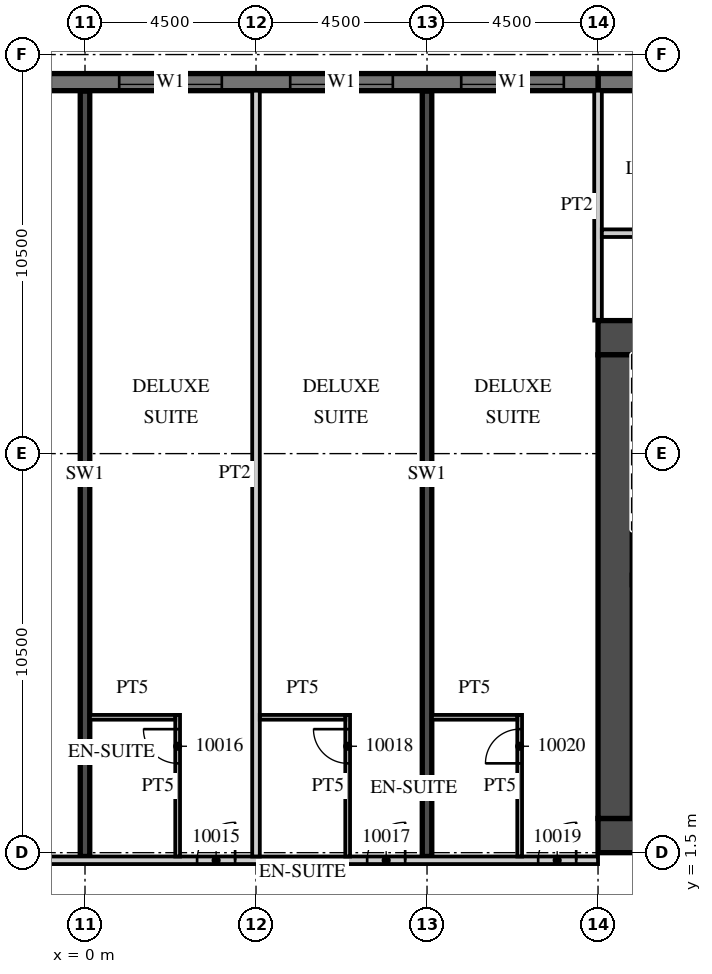
"""IFC4 building model, lengths in metres.
Left out: names, types, materials, properties, quantities, classifications, styles, units other than length and angle.
Written with IfcOpenShell. Run it as: python <this file> out.ifc"""

import sys

from ifc_helpers import new_model, si_unit, direction, frame, frame_2d, origin, place, context, subcontext, project, spatial, rectangle, extrude, element, fill, save


model = new_model("IFC4")
c1 = context("Model", 3, precision=1e-05, world=origin(), true_north=direction((0.0, 1.0)))
c2 = subcontext(c1, "Body", "Model", "MODEL_VIEW")
j1 = project(units=[si_unit("LENGTHUNIT", "METRE"), si_unit("PLANEANGLEUNIT", "RADIAN")], contexts=[c1])
p1 = place(None, origin())
s1 = spatial("IfcSite", under=j1, at=p1, CompositionType="ELEMENT")
p2 = place(p1, origin())
s2 = spatial("IfcBuilding", under=s1, at=p2, CompositionType="ELEMENT")
p3 = place(p2, frame((0.0, 0.0, 63.3)))
s3 = spatial("IfcBuildingStorey", under=s2, at=p3, CompositionType="ELEMENT", Elevation=63.3)
for number, where, z_axis, x_axis in (
    (1, (0.0, 1.4, 0.0), (0.0, 0.0, 1.0), (0.0, 1.0, 0.0)),
    (2, (9.0, 1.4, 0.0), (0.0, 0.0, 1.0), (0.0, 1.0, 0.0)),
):
    element("IfcWall", number, at=place(p3, frame(where, z_axis=z_axis, x_axis=x_axis)), inside=s3, PredefinedType="SHEAR", context=c2, shape_type="SweptSolid", body=[
        extrude(rectangle(XDim=20.14, YDim=0.25, at=frame_2d((10.07, 0.0))), origin(), (0.0, 0.0, 1.0), 3.3),
    ])
p4 = place(p3, frame((31.5, 21.775, 0.0), z_axis=(0.0, 0.0, 1.0), x_axis=(-1.0, 0.0, 0.0)))
e3 = element("IfcWall", 3, at=p4, inside=s3, PredefinedType="SOLIDWALL", context=c2, shape_type="SweptSolid", body=[
    extrude(rectangle(XDim=18.0, YDim=0.45, at=frame_2d((9.0, 0.0))), origin(), (0.0, 0.0, 1.0), 3.02),
])
p5 = place(p3, frame((13.5, 21.775, 0.0), z_axis=(0.0, 0.0, 1.0), x_axis=(-1.0, 0.0, 0.0)))
e4 = element("IfcWall", 4, at=p5, inside=s3, PredefinedType="SOLIDWALL", context=c2, shape_type="SweptSolid", body=[
    extrude(rectangle(XDim=54.5, YDim=0.45, at=frame_2d((27.25, 0.0))), origin(), (0.0, 0.0, 1.0), 3.02),
])
p6 = place(p5, frame((0.9, 0.0, 0.45)))
e5 = element("IfcOpeningElement", 5, at=p6, cuts=e4, PredefinedType="OPENING", context=c2, shape_type="SweptSolid", body=[
    extrude(rectangle(XDim=2.7, YDim=2.25, at=frame_2d((1.35, 1.125))), frame((0.0, 0.235, 0.0), z_axis=(0.0, -1.0, 0.0), x_axis=(1.0, 0.0, 0.0)), (0.0, 0.0, 1.0), 0.47),
])
p7 = place(p5, frame((5.4, 0.0, 0.45)))
e6 = element("IfcOpeningElement", 6, at=p7, cuts=e4, PredefinedType="OPENING", context=c2, shape_type="SweptSolid", body=[
    extrude(rectangle(XDim=2.7, YDim=2.25, at=frame_2d((1.35, 1.125))), frame((0.0, 0.235, 0.0), z_axis=(0.0, -1.0, 0.0), x_axis=(1.0, 0.0, 0.0)), (0.0, 0.0, 1.0), 0.47),
])
p8 = place(p5, frame((9.9, 0.0, 0.45)))
e7 = element("IfcOpeningElement", 7, at=p8, cuts=e4, PredefinedType="OPENING", context=c2, shape_type="SweptSolid", body=[
    extrude(rectangle(XDim=2.7, YDim=2.25, at=frame_2d((1.35, 1.125))), frame((0.0, 0.235, 0.0), z_axis=(0.0, -1.0, 0.0), x_axis=(1.0, 0.0, 0.0)), (0.0, 0.0, 1.0), 0.47),
])
p9 = place(p5, frame((14.4, 0.0, 0.45)))
e8 = element("IfcOpeningElement", 8, at=p9, cuts=e4, PredefinedType="OPENING", context=c2, shape_type="SweptSolid", body=[
    extrude(rectangle(XDim=2.7, YDim=2.25, at=frame_2d((1.35, 1.125))), frame((0.0, 0.235, 0.0), z_axis=(0.0, -1.0, 0.0), x_axis=(1.0, 0.0, 0.0)), (0.0, 0.0, 1.0), 0.47),
])
p10 = place(p5, frame((18.9, 0.0, 0.45)))
e9 = element("IfcOpeningElement", 9, at=p10, cuts=e4, PredefinedType="OPENING", context=c2, shape_type="SweptSolid", body=[
    extrude(rectangle(XDim=2.7, YDim=2.25, at=frame_2d((1.35, 1.125))), frame((0.0, 0.235, 0.0), z_axis=(0.0, -1.0, 0.0), x_axis=(1.0, 0.0, 0.0)), (0.0, 0.0, 1.0), 0.47),
])
p11 = place(p5, frame((23.4, 0.0, 0.45)))
e10 = element("IfcOpeningElement", 10, at=p11, cuts=e4, PredefinedType="OPENING", context=c2, shape_type="SweptSolid", body=[
    extrude(rectangle(XDim=2.7, YDim=2.25, at=frame_2d((1.35, 1.125))), frame((0.0, 0.235, 0.0), z_axis=(0.0, -1.0, 0.0), x_axis=(1.0, 0.0, 0.0)), (0.0, 0.0, 1.0), 0.47),
])
p12 = place(p5, frame((27.9, 0.0, 0.45)))
e11 = element("IfcOpeningElement", 11, at=p12, cuts=e4, PredefinedType="OPENING", context=c2, shape_type="SweptSolid", body=[
    extrude(rectangle(XDim=2.7, YDim=2.25, at=frame_2d((1.35, 1.125))), frame((0.0, 0.235, 0.0), z_axis=(0.0, -1.0, 0.0), x_axis=(1.0, 0.0, 0.0)), (0.0, 0.0, 1.0), 0.47),
])
p13 = place(p5, frame((32.4, 0.0, 0.45)))
e12 = element("IfcOpeningElement", 12, at=p13, cuts=e4, PredefinedType="OPENING", context=c2, shape_type="SweptSolid", body=[
    extrude(rectangle(XDim=2.7, YDim=2.25, at=frame_2d((1.35, 1.125))), frame((0.0, 0.235, 0.0), z_axis=(0.0, -1.0, 0.0), x_axis=(1.0, 0.0, 0.0)), (0.0, 0.0, 1.0), 0.47),
])
p14 = place(p5, frame((36.9, 0.0, 0.45)))
e13 = element("IfcOpeningElement", 13, at=p14, cuts=e4, PredefinedType="OPENING", context=c2, shape_type="SweptSolid", body=[
    extrude(rectangle(XDim=2.7, YDim=2.25, at=frame_2d((1.35, 1.125))), frame((0.0, 0.235, 0.0), z_axis=(0.0, -1.0, 0.0), x_axis=(1.0, 0.0, 0.0)), (0.0, 0.0, 1.0), 0.47),
])
p15 = place(p5, frame((41.4, 0.0, 0.45)))
e14 = element("IfcOpeningElement", 14, at=p15, cuts=e4, PredefinedType="OPENING", context=c2, shape_type="SweptSolid", body=[
    extrude(rectangle(XDim=2.7, YDim=2.25, at=frame_2d((1.35, 1.125))), frame((0.0, 0.235, 0.0), z_axis=(0.0, -1.0, 0.0), x_axis=(1.0, 0.0, 0.0)), (0.0, 0.0, 1.0), 0.47),
])
p16 = place(p5, frame((45.9, 0.0, 0.45)))
e15 = element("IfcOpeningElement", 15, at=p16, cuts=e4, PredefinedType="OPENING", context=c2, shape_type="SweptSolid", body=[
    extrude(rectangle(XDim=2.7, YDim=2.25, at=frame_2d((1.35, 1.125))), frame((0.0, 0.235, 0.0), z_axis=(0.0, -1.0, 0.0), x_axis=(1.0, 0.0, 0.0)), (0.0, 0.0, 1.0), 0.47),
])
p17 = place(p5, frame((50.4, 0.0, 0.45)))
e16 = element("IfcOpeningElement", 16, at=p17, cuts=e4, PredefinedType="OPENING", context=c2, shape_type="SweptSolid", body=[
    extrude(rectangle(XDim=2.7, YDim=2.25, at=frame_2d((1.35, 1.125))), frame((0.0, 0.235, 0.0), z_axis=(0.0, -1.0, 0.0), x_axis=(1.0, 0.0, 0.0)), (0.0, 0.0, 1.0), 0.47),
])
p18 = place(p3, frame((13.5, 15.5, 0.0), z_axis=(0.0, 0.0, 1.0), x_axis=(0.0, 1.0, 0.0)))
e17 = element("IfcWall", 17, at=p18, inside=s3, PredefinedType="PARTITIONING", context=c2, shape_type="SweptSolid", body=[
    extrude(rectangle(XDim=6.05, YDim=0.2, at=frame_2d((3.025, 0.0))), origin(), (0.0, 0.0, 1.0), 3.02),
])
p19 = place(p3, frame((-44.55, 1.3, 0.0), z_axis=(0.0, 0.0, 1.0), x_axis=(1.0, 0.0, 0.0)))
e18 = element("IfcWall", 18, at=p19, inside=s3, PredefinedType="PARTITIONING", context=c2, shape_type="SweptSolid", body=[
    extrude(rectangle(XDim=58.05, YDim=0.2, at=frame_2d((29.025, 0.0))), origin(), (0.0, 0.0, 1.0), 3.02),
])
p20 = place(p19, frame((0.525, 0.0, 0.0)))
e19 = element("IfcOpeningElement", 19, at=p20, cuts=e18, PredefinedType="OPENING", context=c2, shape_type="SweptSolid", body=[
    extrude(rectangle(XDim=1.0, YDim=2.1, at=frame_2d((0.5, 1.05))), frame((0.0, 0.11, 0.0), z_axis=(0.0, -1.0, 0.0), x_axis=(1.0, 0.0, 0.0)), (0.0, 0.0, 1.0), 0.22),
])
p21 = place(p19, frame((6.975, 0.0, 0.0)))
e20 = element("IfcOpeningElement", 20, at=p21, cuts=e18, PredefinedType="OPENING", context=c2, shape_type="SweptSolid", body=[
    extrude(rectangle(XDim=1.0, YDim=2.1, at=frame_2d((0.5, 1.05))), frame((0.0, 0.11, 0.0), z_axis=(0.0, -1.0, 0.0), x_axis=(1.0, 0.0, 0.0)), (0.0, 0.0, 1.0), 0.22),
])
p22 = place(p19, frame((10.987, 0.0, 0.0)))
e21 = element("IfcOpeningElement", 21, at=p22, cuts=e18, PredefinedType="OPENING", context=c2, shape_type="SweptSolid", body=[
    extrude(rectangle(XDim=1.2, YDim=2.1, at=frame_2d((0.6, 1.05))), frame((0.0, 0.11, 0.0), z_axis=(0.0, -1.0, 0.0), x_axis=(1.0, 0.0, 0.0)), (0.0, 0.0, 1.0), 0.22),
])
p23 = place(p19, frame((19.987, 0.0, 0.0)))
e22 = element("IfcOpeningElement", 22, at=p23, cuts=e18, PredefinedType="OPENING", context=c2, shape_type="SweptSolid", body=[
    extrude(rectangle(XDim=1.2, YDim=2.1, at=frame_2d((0.6, 1.05))), frame((0.0, 0.11, 0.0), z_axis=(0.0, -1.0, 0.0), x_axis=(1.0, 0.0, 0.0)), (0.0, 0.0, 1.0), 0.22),
])
p24 = place(p19, frame((29.5, 0.0, 0.0)))
e23 = element("IfcOpeningElement", 23, at=p24, cuts=e18, PredefinedType="OPENING", context=c2, shape_type="SweptSolid", body=[
    extrude(rectangle(XDim=1.0, YDim=2.1, at=frame_2d((0.5, 1.05))), frame((0.0, 0.11, 0.0), z_axis=(0.0, -1.0, 0.0), x_axis=(1.0, 0.0, 0.0)), (0.0, 0.0, 1.0), 0.22),
])
p25 = place(p19, frame((33.975, 0.0, 0.0)))
e24 = element("IfcOpeningElement", 24, at=p25, cuts=e18, PredefinedType="OPENING", context=c2, shape_type="SweptSolid", body=[
    extrude(rectangle(XDim=1.0, YDim=2.1, at=frame_2d((0.5, 1.05))), frame((0.0, 0.11, 0.0), z_axis=(0.0, -1.0, 0.0), x_axis=(1.0, 0.0, 0.0)), (0.0, 0.0, 1.0), 0.22),
])
p26 = place(p19, frame((40.912, 0.0, 0.0)))
e25 = element("IfcOpeningElement", 25, at=p26, cuts=e18, PredefinedType="OPENING", context=c2, shape_type="SweptSolid", body=[
    extrude(rectangle(XDim=1.2, YDim=2.1, at=frame_2d((0.6, 1.05))), frame((0.0, 0.11, 0.0), z_axis=(0.0, -1.0, 0.0), x_axis=(1.0, 0.0, 0.0)), (0.0, 0.0, 1.0), 0.22),
])
p27 = place(p19, frame((47.5, 0.0, 0.0)))
e26 = element("IfcOpeningElement", 26, at=p27, cuts=e18, PredefinedType="OPENING", context=c2, shape_type="SweptSolid", body=[
    extrude(rectangle(XDim=1.0, YDim=2.1, at=frame_2d((0.5, 1.05))), frame((0.0, 0.11, 0.0), z_axis=(0.0, -1.0, 0.0), x_axis=(1.0, 0.0, 0.0)), (0.0, 0.0, 1.0), 0.22),
])
p28 = place(p19, frame((51.975, 0.0, 0.0)))
e27 = element("IfcOpeningElement", 27, at=p28, cuts=e18, PredefinedType="OPENING", context=c2, shape_type="SweptSolid", body=[
    extrude(rectangle(XDim=1.0, YDim=2.1, at=frame_2d((0.5, 1.05))), frame((0.0, 0.11, 0.0), z_axis=(0.0, -1.0, 0.0), x_axis=(1.0, 0.0, 0.0)), (0.0, 0.0, 1.0), 0.22),
])
p29 = place(p19, frame((56.475, 0.0, 0.0)))
e28 = element("IfcOpeningElement", 28, at=p29, cuts=e18, PredefinedType="OPENING", context=c2, shape_type="SweptSolid", body=[
    extrude(rectangle(XDim=1.0, YDim=2.1, at=frame_2d((0.5, 1.05))), frame((0.0, 0.11, 0.0), z_axis=(0.0, -1.0, 0.0), x_axis=(1.0, 0.0, 0.0)), (0.0, 0.0, 1.0), 0.22),
])
p30 = place(p3, frame((4.5, 1.4, 0.0), z_axis=(0.0, 0.0, 1.0), x_axis=(0.0, 1.0, 0.0)))
e29 = element("IfcWall", 29, at=p30, inside=s3, PredefinedType="PARTITIONING", context=c2, shape_type="SweptSolid", body=[
    extrude(rectangle(XDim=20.15, YDim=0.2, at=frame_2d((10.075, 0.0))), origin(), (0.0, 0.0, 1.0), 3.02),
])
p31 = place(p3, frame((2.438, 1.4, 0.0), z_axis=(0.0, 0.0, 1.0), x_axis=(0.0, 1.0, 0.0)))
e30 = element("IfcWall", 30, at=p31, inside=s3, PredefinedType="PARTITIONING", context=c2, shape_type="SweptSolid", body=[
    extrude(rectangle(XDim=3.725, YDim=0.125, at=frame_2d((1.863, 0.0))), origin(), (0.0, 0.0, 1.0), 3.02),
])
p32 = place(p31, frame((2.45, 0.0, 0.0)))
e31 = element("IfcOpeningElement", 31, at=p32, cuts=e30, PredefinedType="OPENING", context=c2, shape_type="SweptSolid", body=[
    extrude(rectangle(XDim=0.9, YDim=2.1, at=frame_2d((0.45, 1.05))), frame((0.0, 0.073, 0.0), z_axis=(0.0, -1.0, 0.0), x_axis=(1.0, 0.0, 0.0)), (0.0, 0.0, 1.0), 0.145),
])
p33 = place(p3, frame((0.125, 5.062, 0.0), z_axis=(0.0, 0.0, 1.0), x_axis=(1.0, 0.0, 0.0)))
e32 = element("IfcWall", 32, at=p33, inside=s3, PredefinedType="PARTITIONING", context=c2, shape_type="SweptSolid", body=[
    extrude(rectangle(XDim=2.25, YDim=0.125, at=frame_2d((1.125, 0.0))), origin(), (0.0, 0.0, 1.0), 3.02),
])
p34 = place(p3, frame((6.912, 1.4, 0.0), z_axis=(0.0, 0.0, 1.0), x_axis=(0.0, 1.0, 0.0)))
e33 = element("IfcWall", 33, at=p34, inside=s3, PredefinedType="PARTITIONING", context=c2, shape_type="SweptSolid", body=[
    extrude(rectangle(XDim=3.725, YDim=0.125, at=frame_2d((1.863, 0.0))), origin(), (0.0, 0.0, 1.0), 3.02),
])
p35 = place(p34, frame((2.45, 0.0, 0.0)))
e34 = element("IfcOpeningElement", 34, at=p35, cuts=e33, PredefinedType="OPENING", context=c2, shape_type="SweptSolid", body=[
    extrude(rectangle(XDim=0.9, YDim=2.1, at=frame_2d((0.45, 1.05))), frame((0.0, 0.073, 0.0), z_axis=(0.0, -1.0, 0.0), x_axis=(1.0, 0.0, 0.0)), (0.0, 0.0, 1.0), 0.145),
])
p36 = place(p3, frame((4.6, 5.062, 0.0), z_axis=(0.0, 0.0, 1.0), x_axis=(1.0, 0.0, 0.0)))
e35 = element("IfcWall", 35, at=p36, inside=s3, PredefinedType="PARTITIONING", context=c2, shape_type="SweptSolid", body=[
    extrude(rectangle(XDim=2.25, YDim=0.125, at=frame_2d((1.125, 0.0))), origin(), (0.0, 0.0, 1.0), 3.02),
])
p37 = place(p3, frame((11.438, 1.4, 0.0), z_axis=(0.0, 0.0, 1.0), x_axis=(0.0, 1.0, 0.0)))
e36 = element("IfcWall", 36, at=p37, inside=s3, PredefinedType="PARTITIONING", context=c2, shape_type="SweptSolid", body=[
    extrude(rectangle(XDim=3.725, YDim=0.125, at=frame_2d((1.863, 0.0))), origin(), (0.0, 0.0, 1.0), 3.02),
])
p38 = place(p37, frame((2.45, 0.0, 0.0)))
e37 = element("IfcOpeningElement", 37, at=p38, cuts=e36, PredefinedType="OPENING", context=c2, shape_type="SweptSolid", body=[
    extrude(rectangle(XDim=0.9, YDim=2.1, at=frame_2d((0.45, 1.05))), frame((0.0, 0.073, 0.0), z_axis=(0.0, -1.0, 0.0), x_axis=(1.0, 0.0, 0.0)), (0.0, 0.0, 1.0), 0.145),
])
p39 = place(p3, frame((9.125, 5.062, 0.0), z_axis=(0.0, 0.0, 1.0), x_axis=(1.0, 0.0, 0.0)))
e38 = element("IfcWall", 38, at=p39, inside=s3, PredefinedType="PARTITIONING", context=c2, shape_type="SweptSolid", body=[
    extrude(rectangle(XDim=2.25, YDim=0.125, at=frame_2d((1.125, 0.0))), origin(), (0.0, 0.0, 1.0), 3.02),
])
p40 = place(p3, frame((13.5, 1.95, 0.0), z_axis=(0.0, 0.0, 1.0), x_axis=(1.0, 0.0, 0.0)))
e39 = element("IfcWall", 39, at=p40, inside=s3, PredefinedType="SHEAR", context=c2, shape_type="SweptSolid", body=[
    extrude(rectangle(XDim=18.0, YDim=0.9, at=frame_2d((9.0, 0.0))), origin(), (0.0, 0.0, 1.0), 3.02),
])
p41 = place(p40, frame((1.475, 0.0, 0.0)))
e40 = element("IfcOpeningElement", 40, at=p41, cuts=e39, PredefinedType="OPENING", context=c2, shape_type="SweptSolid", body=[
    extrude(rectangle(XDim=1.8, YDim=2.1, at=frame_2d((0.9, 1.05))), frame((0.0, 0.46, 0.0), z_axis=(0.0, -1.0, 0.0), x_axis=(1.0, 0.0, 0.0)), (0.0, 0.0, 1.0), 0.92),
])
p42 = place(p3, frame((13.5, 15.05, 0.0), z_axis=(0.0, 0.0, 1.0), x_axis=(1.0, 0.0, 0.0)))
e41 = element("IfcWall", 41, at=p42, inside=s3, PredefinedType="SHEAR", context=c2, shape_type="SweptSolid", body=[
    extrude(rectangle(XDim=6.8, YDim=0.9, at=frame_2d((3.4, 0.0))), origin(), (0.0, 0.0, 1.0), 3.02),
])
p43 = place(p42, frame((4.725, 0.0, 0.0)))
e42 = element("IfcOpeningElement", 42, at=p43, cuts=e41, PredefinedType="OPENING", context=c2, shape_type="SweptSolid", body=[
    extrude(rectangle(XDim=1.2, YDim=2.1, at=frame_2d((0.6, 1.05))), frame((0.0, 0.46, 0.0), z_axis=(0.0, -1.0, 0.0), x_axis=(1.0, 0.0, 0.0)), (0.0, 0.0, 1.0), 0.92),
])
p44 = place(p3, frame((13.95, 2.4, 0.0), z_axis=(0.0, 0.0, 1.0), x_axis=(0.0, 1.0, 0.0)))
e43 = element("IfcWall", 43, at=p44, inside=s3, PredefinedType="SHEAR", context=c2, shape_type="SweptSolid", body=[
    extrude(rectangle(XDim=12.2, YDim=0.9, at=frame_2d((6.1, 0.0))), origin(), (0.0, 0.0, 1.0), 3.02),
])
p45 = place(p3, frame((13.6, 17.8, 0.0), z_axis=(0.0, 0.0, 1.0), x_axis=(1.0, 0.0, 0.0)))
e44 = element("IfcWall", 44, at=p45, inside=s3, PredefinedType="PARTITIONING", context=c2, shape_type="SweptSolid", body=[
    extrude(rectangle(XDim=30.95, YDim=0.2, at=frame_2d((15.475, 0.0))), origin(), (0.0, 0.0, 1.0), 3.02),
])
p46 = place(p45, frame((16.613, 0.0, 0.0)))
e45 = element("IfcOpeningElement", 45, at=p46, cuts=e44, PredefinedType="OPENING", context=c2, shape_type="SweptSolid", body=[
    extrude(rectangle(XDim=0.9, YDim=2.1, at=frame_2d((0.45, 1.05))), frame((0.0, 0.11, 0.0), z_axis=(0.0, -1.0, 0.0), x_axis=(1.0, 0.0, 0.0)), (0.0, 0.0, 1.0), 0.22),
])
p47 = place(p45, frame((8.312, 0.0, 0.0)))
e46 = element("IfcOpeningElement", 46, at=p47, cuts=e44, PredefinedType="OPENING", context=c2, shape_type="SweptSolid", body=[
    extrude(rectangle(XDim=0.9, YDim=2.1, at=frame_2d((0.45, 1.05))), frame((0.0, 0.11, 0.0), z_axis=(0.0, -1.0, 0.0), x_axis=(1.0, 0.0, 0.0)), (0.0, 0.0, 1.0), 0.22),
])
p48 = place(p6, origin())
e47 = element("IfcWindow", 47, at=p48, inside=s3, PartitioningType="SINGLE_PANEL", PredefinedType="WINDOW", context=c2, shape_type="SweptSolid", body=[
    extrude(rectangle(XDim=2.7, YDim=2.25, at=frame_2d((1.35, 1.125))), frame((0.0, 0.09, 0.0), z_axis=(0.0, -1.0, 0.0), x_axis=(1.0, 0.0, 0.0)), (0.0, 0.0, 1.0), 0.06),
])
fill(e5, e47)
p49 = place(p7, origin())
e48 = element("IfcWindow", 48, at=p49, inside=s3, PartitioningType="SINGLE_PANEL", PredefinedType="WINDOW", context=c2, shape_type="SweptSolid", body=[
    extrude(rectangle(XDim=2.7, YDim=2.25, at=frame_2d((1.35, 1.125))), frame((0.0, 0.09, 0.0), z_axis=(0.0, -1.0, 0.0), x_axis=(1.0, 0.0, 0.0)), (0.0, 0.0, 1.0), 0.06),
])
fill(e6, e48)
p50 = place(p8, origin())
e49 = element("IfcWindow", 49, at=p50, inside=s3, PartitioningType="SINGLE_PANEL", PredefinedType="WINDOW", context=c2, shape_type="SweptSolid", body=[
    extrude(rectangle(XDim=2.7, YDim=2.25, at=frame_2d((1.35, 1.125))), frame((0.0, 0.09, 0.0), z_axis=(0.0, -1.0, 0.0), x_axis=(1.0, 0.0, 0.0)), (0.0, 0.0, 1.0), 0.06),
])
fill(e7, e49)
p51 = place(p27, origin())
e50 = element("IfcDoor", 50, at=p51, inside=s3, OperationType="SINGLE_SWING_RIGHT", PredefinedType="DOOR", context=c2, shape_type="SweptSolid", body=[
    extrude(rectangle(XDim=1.0, YDim=2.1, at=frame_2d((0.5, 1.05))), frame((0.0, 0.025, 0.0), z_axis=(0.0, -1.0, 0.0), x_axis=(1.0, 0.0, 0.0)), (0.0, 0.0, 1.0), 0.05),
])
fill(e26, e50)
p52 = place(p32, origin())
e51 = element("IfcDoor", 51, at=p52, inside=s3, OperationType="SINGLE_SWING_RIGHT", PredefinedType="DOOR", context=c2, shape_type="SweptSolid", body=[
    extrude(rectangle(XDim=0.9, YDim=2.1, at=frame_2d((0.45, 1.05))), frame((0.0, 0.025, 0.0), z_axis=(0.0, -1.0, 0.0), x_axis=(1.0, 0.0, 0.0)), (0.0, 0.0, 1.0), 0.05),
])
fill(e31, e51)
p53 = place(p28, origin())
e52 = element("IfcDoor", 52, at=p53, inside=s3, OperationType="SINGLE_SWING_RIGHT", PredefinedType="DOOR", context=c2, shape_type="SweptSolid", body=[
    extrude(rectangle(XDim=1.0, YDim=2.1, at=frame_2d((0.5, 1.05))), frame((0.0, 0.025, 0.0), z_axis=(0.0, -1.0, 0.0), x_axis=(1.0, 0.0, 0.0)), (0.0, 0.0, 1.0), 0.05),
])
fill(e27, e52)
p54 = place(p35, origin())
e53 = element("IfcDoor", 53, at=p54, inside=s3, OperationType="SINGLE_SWING_RIGHT", PredefinedType="DOOR", context=c2, shape_type="SweptSolid", body=[
    extrude(rectangle(XDim=0.9, YDim=2.1, at=frame_2d((0.45, 1.05))), frame((0.0, 0.025, 0.0), z_axis=(0.0, -1.0, 0.0), x_axis=(1.0, 0.0, 0.0)), (0.0, 0.0, 1.0), 0.05),
])
fill(e34, e53)
p55 = place(p29, origin())
e54 = element("IfcDoor", 54, at=p55, inside=s3, OperationType="SINGLE_SWING_RIGHT", PredefinedType="DOOR", context=c2, shape_type="SweptSolid", body=[
    extrude(rectangle(XDim=1.0, YDim=2.1, at=frame_2d((0.5, 1.05))), frame((0.0, 0.025, 0.0), z_axis=(0.0, -1.0, 0.0), x_axis=(1.0, 0.0, 0.0)), (0.0, 0.0, 1.0), 0.05),
])
fill(e28, e54)
p56 = place(p38, origin())
e55 = element("IfcDoor", 55, at=p56, inside=s3, OperationType="SINGLE_SWING_LEFT", PredefinedType="DOOR", context=c2, shape_type="SweptSolid", body=[
    extrude(rectangle(XDim=0.9, YDim=2.1, at=frame_2d((0.45, 1.05))), frame((0.0, 0.025, 0.0), z_axis=(0.0, -1.0, 0.0), x_axis=(1.0, 0.0, 0.0)), (0.0, 0.0, 1.0), 0.05),
])
fill(e37, e55)
save(model, sys.argv[1])
